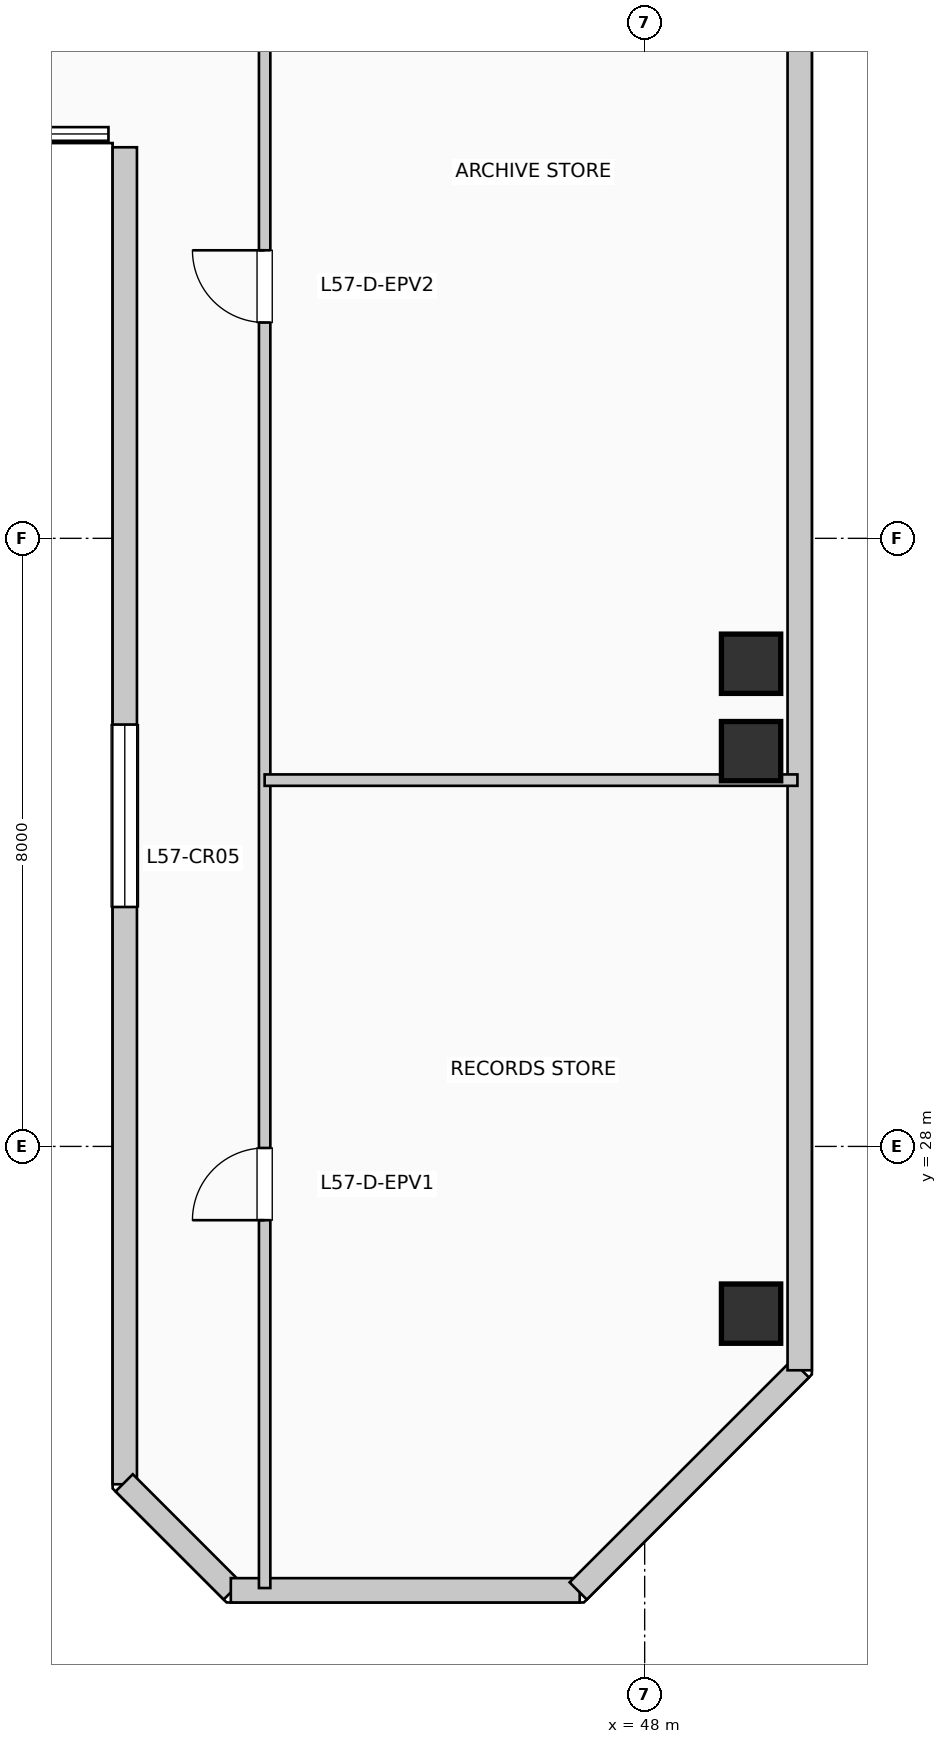
"""IFC4 building model, lengths in metres.
Left out: names, types, materials, properties, quantities, classifications, styles, units other than length and angle.
Written with IfcOpenShell. Run it as: python <this file> out.ifc"""

import sys

from ifc_helpers import new_model, si_unit, direction, frame, frame_2d, origin, origin_2d, place, context, subcontext, project, spatial, rectangle, extrude, element, fill, save


model = new_model("IFC4")
c1 = context("Model", 3, precision=1e-05, world=origin(), true_north=direction((0.0, 1.0)))
c2 = subcontext(c1, "Body", "Model", "MODEL_VIEW")
j1 = project(units=[si_unit("LENGTHUNIT", "METRE"), si_unit("PLANEANGLEUNIT", "RADIAN")], contexts=[c1])
p1 = place(None, origin())
s1 = spatial("IfcSite", under=j1, at=p1, CompositionType="ELEMENT")
p2 = place(p1, origin())
s2 = spatial("IfcBuilding", under=s1, at=p2, CompositionType="ELEMENT")
p3 = place(p2, frame((0.0, 0.0, 235.62)))
s3 = spatial("IfcBuildingStorey", under=s2, at=p3, CompositionType="ELEMENT", Elevation=235.62)
for number, where, z_axis, x_axis in (
    (1, (49.4, 25.8, 0.0), (0.0, 0.0, 1.0), (1.0, 0.0, 0.0)),
    (2, (49.4, 33.2, 0.0), (0.0, 0.0, 1.0), (1.0, 0.0, 0.0)),
    (3, (49.4, 34.35, 0.0), (0.0, 0.0, 1.0), (1.0, 0.0, 0.0)),
):
    element("IfcColumn", number, at=place(p3, frame(where, z_axis=z_axis, x_axis=x_axis)), inside=s3, PredefinedType="COLUMN", context=c2, shape_type="SweptSolid", body=[
        extrude(rectangle(XDim=0.78, YDim=0.78, at=origin_2d()), origin(), (0.0, 0.0, 1.0), 3.96),
    ])
p4 = place(p3, frame((41.16, 41.145, 0.0), z_axis=(0.0, 0.0, 1.0), x_axis=(0.0, -1.0, 0.0)))
e4 = element("IfcWall", 4, at=p4, inside=s3, PredefinedType="SOLIDWALL", context=c2, shape_type="SweptSolid", body=[
    extrude(rectangle(XDim=17.59, YDim=0.32, at=frame_2d((8.795, 0.0))), origin(), (0.0, 0.0, 1.0), 3.71),
])
p5 = place(p4, frame((7.595, 0.0, 0.85)))
e5 = element("IfcOpeningElement", 5, at=p5, cuts=e4, PredefinedType="OPENING", context=c2, shape_type="SweptSolid", body=[
    extrude(rectangle(XDim=2.4, YDim=2.05, at=frame_2d((1.2, 1.025))), frame((0.0, 0.17, 0.0), z_axis=(0.0, -1.0, 0.0), x_axis=(1.0, 0.0, 0.0)), (0.0, 0.0, 1.0), 0.34),
])
p6 = place(p3, frame((41.152, 23.574, 0.0), z_axis=(0.0, 0.0, 1.0), x_axis=(0.707106781187, -0.707106781187, 0.0)))
e6 = element("IfcWall", 6, at=p6, inside=s3, PredefinedType="SOLIDWALL", context=c2, shape_type="SweptSolid", body=[
    extrude(rectangle(XDim=2.011, YDim=0.32, at=frame_2d((1.006, 0.0))), origin(), (0.0, 0.0, 1.0), 3.71),
])
p7 = place(p3, frame((42.555, 22.16, 0.0), z_axis=(0.0, 0.0, 1.0), x_axis=(1.0, 0.0, 0.0)))
e7 = element("IfcWall", 7, at=p7, inside=s3, PredefinedType="SOLIDWALL", context=c2, shape_type="SweptSolid", body=[
    extrude(rectangle(XDim=4.59, YDim=0.32, at=frame_2d((2.295, 0.0))), origin(), (0.0, 0.0, 1.0), 3.71),
])
p8 = place(p3, frame((47.126, 22.152, 0.0), z_axis=(0.0, 0.0, 1.0), x_axis=(0.707136318428, 0.707077242712, 0.0)))
e8 = element("IfcWall", 8, at=p8, inside=s3, PredefinedType="SOLIDWALL", context=c2, shape_type="SweptSolid", body=[
    extrude(rectangle(XDim=4.133, YDim=0.32, at=frame_2d((2.066, 0.0))), origin(), (0.0, 0.0, 1.0), 3.71),
])
p9 = place(p3, frame((50.04, 25.055, 0.0), z_axis=(0.0, 0.0, 1.0), x_axis=(0.0, 1.0, 0.0)))
e9 = element("IfcWall", 9, at=p9, inside=s3, PredefinedType="SOLIDWALL", context=c2, shape_type="SweptSolid", body=[
    extrude(rectangle(XDim=17.89, YDim=0.32, at=frame_2d((8.945, 0.0))), origin(), (0.0, 0.0, 1.0), 3.71),
])
p10 = place(p3, frame((43.0, 22.19, 0.0), z_axis=(0.0, 0.0, 1.0), x_axis=(0.0, 1.0, 0.0)))
e10 = element("IfcWall", 10, at=p10, inside=s3, PredefinedType="PARTITIONING", context=c2, shape_type="SweptSolid", body=[
    extrude(rectangle(XDim=23.62, YDim=0.15, at=frame_2d((11.81, 0.0))), origin(), (0.0, 0.0, 1.0), 3.71),
])
p11 = place(p10, frame((4.84, 0.0, 0.0)))
e11 = element("IfcOpeningElement", 11, at=p11, cuts=e10, PredefinedType="OPENING", context=c2, shape_type="SweptSolid", body=[
    extrude(rectangle(XDim=0.95, YDim=2.15, at=frame_2d((0.475, 1.075))), frame((0.0, 0.085, 0.0), z_axis=(0.0, -1.0, 0.0), x_axis=(1.0, 0.0, 0.0)), (0.0, 0.0, 1.0), 0.17),
])
p12 = place(p10, frame((16.649, 0.0, 0.0)))
e12 = element("IfcOpeningElement", 12, at=p12, cuts=e10, PredefinedType="OPENING", context=c2, shape_type="SweptSolid", body=[
    extrude(rectangle(XDim=0.95, YDim=2.15, at=frame_2d((0.475, 1.075))), frame((0.0, 0.085, 0.0), z_axis=(0.0, -1.0, 0.0), x_axis=(1.0, 0.0, 0.0)), (0.0, 0.0, 1.0), 0.17),
])
p13 = place(p3, frame((43.0, 32.819, 0.0), z_axis=(0.0, 0.0, 1.0), x_axis=(1.0, 0.0, 0.0)))
e13 = element("IfcWall", 13, at=p13, inside=s3, PredefinedType="PARTITIONING", context=c2, shape_type="SweptSolid", body=[
    extrude(rectangle(XDim=7.01, YDim=0.15, at=frame_2d((3.505, 0.0))), origin(), (0.0, 0.0, 1.0), 3.71),
])
p14 = place(p5, origin())
e14 = element("IfcWindow", 14, at=p14, inside=s3, PartitioningType="SINGLE_PANEL", PredefinedType="WINDOW", context=c2, shape_type="SweptSolid", body=[
    extrude(rectangle(XDim=2.4, YDim=2.05, at=frame_2d((1.2, 1.025))), frame((0.0, 0.03, 0.0), z_axis=(0.0, -1.0, 0.0), x_axis=(1.0, 0.0, 0.0)), (0.0, 0.0, 1.0), 0.06),
])
fill(e5, e14)
p15 = place(p11, origin())
e15 = element("IfcDoor", 15, at=p15, inside=s3, OperationType="SINGLE_SWING_LEFT", PredefinedType="DOOR", context=c2, shape_type="SweptSolid", body=[
    extrude(rectangle(XDim=0.95, YDim=2.15, at=frame_2d((0.475, 1.075))), frame((0.0, 0.025, 0.0), z_axis=(0.0, -1.0, 0.0), x_axis=(1.0, 0.0, 0.0)), (0.0, 0.0, 1.0), 0.05),
])
fill(e11, e15)
p16 = place(p12, origin())
e16 = element("IfcDoor", 16, at=p16, inside=s3, OperationType="SINGLE_SWING_RIGHT", PredefinedType="DOOR", context=c2, shape_type="SweptSolid", body=[
    extrude(rectangle(XDim=0.95, YDim=2.15, at=frame_2d((0.475, 1.075))), frame((0.0, 0.025, 0.0), z_axis=(0.0, -1.0, 0.0), x_axis=(1.0, 0.0, 0.0)), (0.0, 0.0, 1.0), 0.05),
])
fill(e12, e16)
save(model, sys.argv[1])
